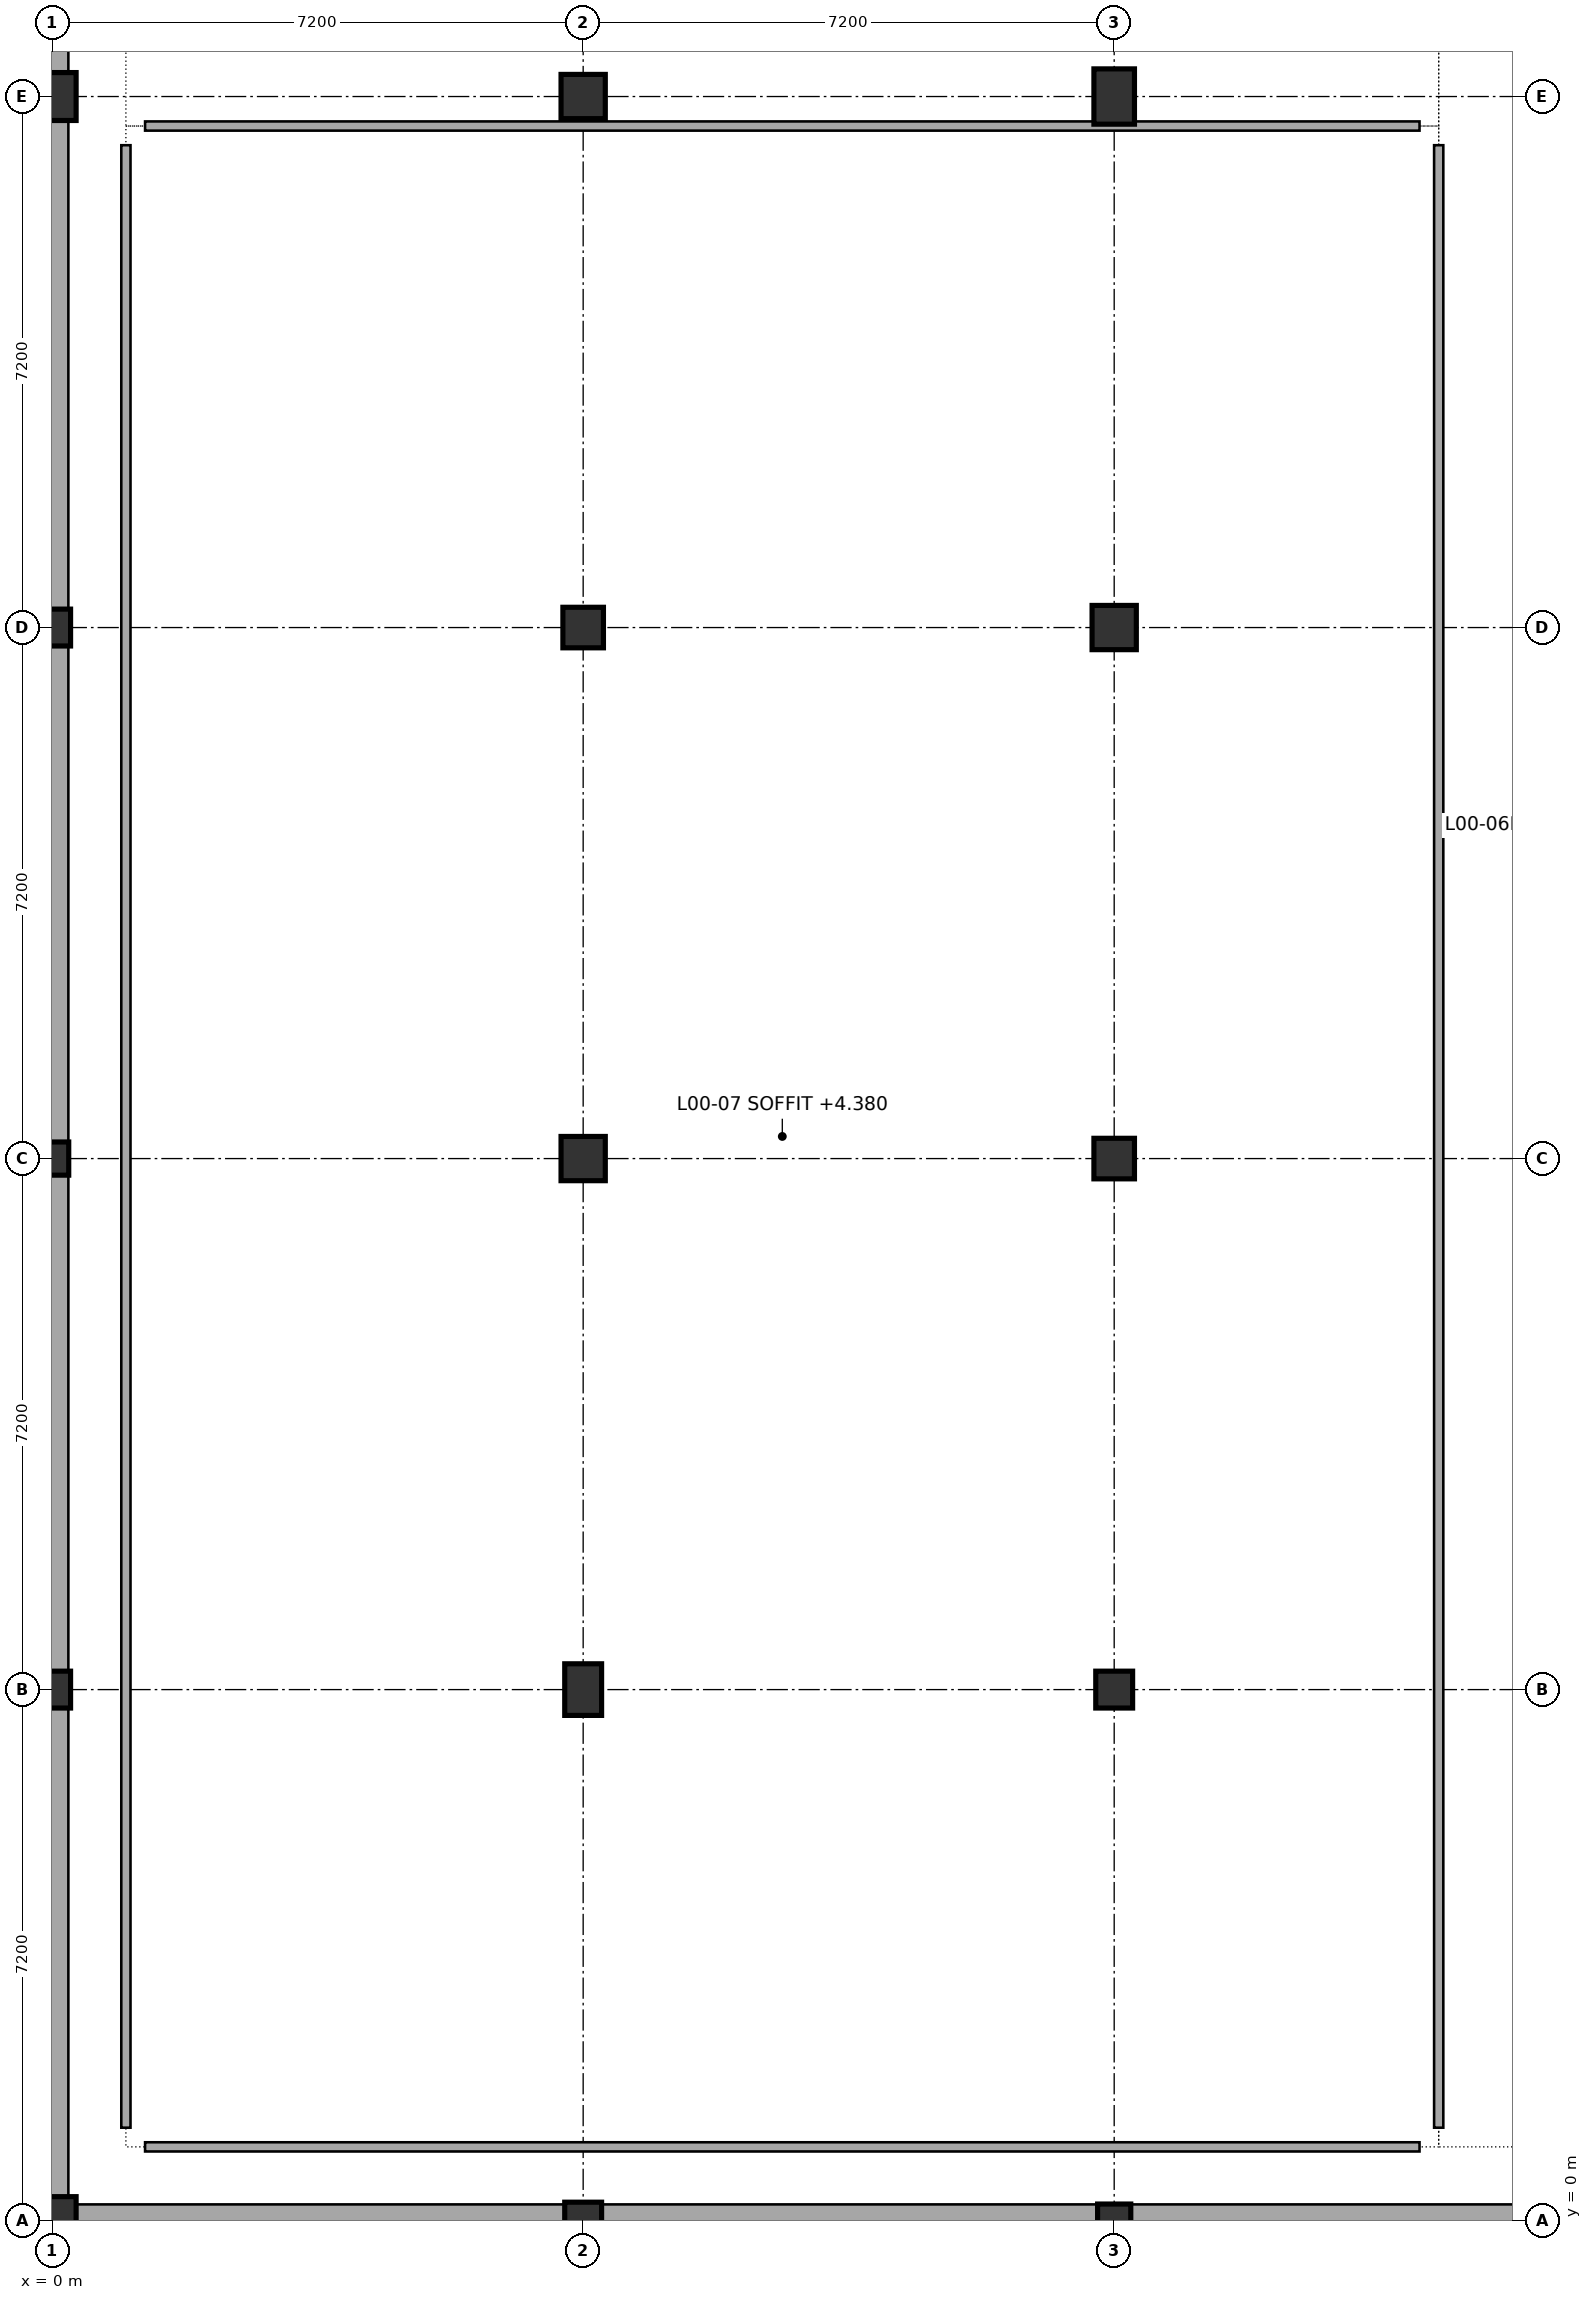
"""IFC4 building model, lengths in metres.
Left out: names, types, materials, properties, quantities, classifications, styles, units other than length and angle.
Written with IfcOpenShell. Run it as: python <this file> out.ifc"""

import sys

from ifc_helpers import new_model, si_unit, direction, frame, frame_2d, origin, origin_with_axes, origin_2d, place, context, subcontext, project, spatial, rectangle, circle, extrude, element, fill, save


model = new_model("IFC4")
c1 = context("Model", 3, precision=1e-05, world=origin(), true_north=direction((0.0, 1.0)))
c2 = subcontext(c1, "Body", "Model", "MODEL_VIEW")
j1 = project(units=[si_unit("LENGTHUNIT", "METRE"), si_unit("PLANEANGLEUNIT", "RADIAN")], contexts=[c1])
p1 = place(None, origin())
s1 = spatial("IfcSite", under=j1, at=p1, CompositionType="ELEMENT")
p2 = place(p1, origin())
s2 = spatial("IfcBuilding", under=s1, at=p2, CompositionType="ELEMENT")
p3 = place(p2, origin())
s3 = spatial("IfcBuildingStorey", under=s2, at=p3, CompositionType="ELEMENT", Elevation=0.0)
p4 = place(p3, origin_with_axes())
e1 = element("IfcColumn", 1, at=p4, inside=s3, PredefinedType="COLUMN", context=c2, shape_type="SweptSolid", body=[
    extrude(circle(Radius=0.325, at=origin_2d()), origin(), (0.0, 0.0, 1.0), 4.8),
])
p5 = place(p3, frame((0.0, 7.2, 0.0), z_axis=(0.0, 0.0, 1.0), x_axis=(1.0, 0.0, 0.0)))
e2 = element("IfcColumn", 2, at=p5, inside=s3, PredefinedType="COLUMN", context=c2, shape_type="SweptSolid", body=[
    extrude(rectangle(XDim=0.5, YDim=0.5, at=origin_2d()), origin(), (0.0, 0.0, 1.0), 4.8),
])
p6 = place(p3, frame((0.0, 14.4, 0.0), z_axis=(0.0, 0.0, 1.0), x_axis=(1.0, 0.0, 0.0)))
e3 = element("IfcColumn", 3, at=p6, inside=s3, PredefinedType="COLUMN", context=c2, shape_type="SweptSolid", body=[
    extrude(rectangle(XDim=0.45, YDim=0.45, at=origin_2d()), origin(), (0.0, 0.0, 1.0), 4.8),
])
p7 = place(p3, frame((0.0, 21.6, 0.0), z_axis=(0.0, 0.0, 1.0), x_axis=(1.0, 0.0, 0.0)))
e4 = element("IfcColumn", 4, at=p7, inside=s3, PredefinedType="COLUMN", context=c2, shape_type="SweptSolid", body=[
    extrude(rectangle(XDim=0.5, YDim=0.5, at=origin_2d()), origin(), (0.0, 0.0, 1.0), 4.8),
])
p8 = place(p3, frame((0.0, 28.8, 0.0), z_axis=(0.0, 0.0, 1.0), x_axis=(1.0, 0.0, 0.0)))
e5 = element("IfcColumn", 5, at=p8, inside=s3, PredefinedType="COLUMN", context=c2, shape_type="SweptSolid", body=[
    extrude(circle(Radius=0.325, at=origin_2d()), origin(), (0.0, 0.0, 1.0), 4.8),
])
p9 = place(p3, frame((7.2, 0.0, 0.0), z_axis=(0.0, 0.0, 1.0), x_axis=(1.0, 0.0, 0.0)))
e6 = element("IfcColumn", 6, at=p9, inside=s3, PredefinedType="COLUMN", context=c2, shape_type="SweptSolid", body=[
    extrude(rectangle(XDim=0.5, YDim=0.5, at=origin_2d()), origin(), (0.0, 0.0, 1.0), 4.8),
])
p10 = place(p3, frame((7.2, 7.2, 0.0), z_axis=(0.0, 0.0, 1.0), x_axis=(1.0, 0.0, 0.0)))
e7 = element("IfcColumn", 7, at=p10, inside=s3, PredefinedType="COLUMN", context=c2, shape_type="SweptSolid", body=[
    extrude(rectangle(XDim=0.5, YDim=0.7, at=origin_2d()), origin(), (0.0, 0.0, 1.0), 4.8),
])
p11 = place(p3, frame((7.2, 14.4, 0.0), z_axis=(0.0, 0.0, 1.0), x_axis=(1.0, 0.0, 0.0)))
e8 = element("IfcColumn", 8, at=p11, inside=s3, PredefinedType="COLUMN", context=c2, shape_type="SweptSolid", body=[
    extrude(rectangle(XDim=0.6, YDim=0.6, at=origin_2d()), origin(), (0.0, 0.0, 1.0), 4.8),
])
p12 = place(p3, frame((7.2, 21.6, 0.0), z_axis=(0.0, 0.0, 1.0), x_axis=(1.0, 0.0, 0.0)))
e9 = element("IfcColumn", 9, at=p12, inside=s3, PredefinedType="COLUMN", context=c2, shape_type="SweptSolid", body=[
    extrude(rectangle(XDim=0.55, YDim=0.55, at=origin_2d()), origin(), (0.0, 0.0, 1.0), 4.8),
])
p13 = place(p3, frame((7.2, 28.8, 0.0), z_axis=(0.0, 0.0, 1.0), x_axis=(1.0, 0.0, 0.0)))
e10 = element("IfcColumn", 10, at=p13, inside=s3, PredefinedType="COLUMN", context=c2, shape_type="SweptSolid", body=[
    extrude(rectangle(XDim=0.6, YDim=0.6, at=origin_2d()), origin(), (0.0, 0.0, 1.0), 4.8),
])
p14 = place(p3, frame((14.4, 0.0, 0.0), z_axis=(0.0, 0.0, 1.0), x_axis=(1.0, 0.0, 0.0)))
e11 = element("IfcColumn", 11, at=p14, inside=s3, PredefinedType="COLUMN", context=c2, shape_type="SweptSolid", body=[
    extrude(rectangle(XDim=0.45, YDim=0.45, at=origin_2d()), origin(), (0.0, 0.0, 1.0), 4.8),
])
p15 = place(p3, frame((14.4, 7.2, 0.0), z_axis=(0.0, 0.0, 1.0), x_axis=(1.0, 0.0, 0.0)))
e12 = element("IfcColumn", 12, at=p15, inside=s3, PredefinedType="COLUMN", context=c2, shape_type="SweptSolid", body=[
    extrude(rectangle(XDim=0.5, YDim=0.5, at=origin_2d()), origin(), (0.0, 0.0, 1.0), 4.8),
])
p16 = place(p3, frame((14.4, 14.4, 0.0), z_axis=(0.0, 0.0, 1.0), x_axis=(1.0, 0.0, 0.0)))
e13 = element("IfcColumn", 13, at=p16, inside=s3, PredefinedType="COLUMN", context=c2, shape_type="SweptSolid", body=[
    extrude(rectangle(XDim=0.55, YDim=0.55, at=origin_2d()), origin(), (0.0, 0.0, 1.0), 4.8),
])
p17 = place(p3, frame((14.4, 21.6, 0.0), z_axis=(0.0, 0.0, 1.0), x_axis=(1.0, 0.0, 0.0)))
e14 = element("IfcColumn", 14, at=p17, inside=s3, PredefinedType="COLUMN", context=c2, shape_type="SweptSolid", body=[
    extrude(rectangle(XDim=0.6, YDim=0.6, at=origin_2d()), origin(), (0.0, 0.0, 1.0), 4.8),
])
p18 = place(p3, frame((14.4, 28.8, 0.0), z_axis=(0.0, 0.0, 1.0), x_axis=(1.0, 0.0, 0.0)))
e15 = element("IfcColumn", 15, at=p18, inside=s3, PredefinedType="COLUMN", context=c2, shape_type="SweptSolid", body=[
    extrude(rectangle(XDim=0.55, YDim=0.75, at=origin_2d()), origin(), (0.0, 0.0, 1.0), 4.8),
])
p19 = place(p3, frame((21.6, 0.0, 0.0), z_axis=(0.0, 0.0, 1.0), x_axis=(-1.0, 0.0, 0.0)))
e16 = element("IfcWall", 16, at=p19, inside=s3, PredefinedType="STANDARD", context=c2, shape_type="SweptSolid", body=[
    extrude(rectangle(XDim=7.2, YDim=0.44, at=frame_2d((3.6, 0.0))), origin(), (0.0, 0.0, 1.0), 4.44),
])
p20 = place(p19, frame((2.85, 0.0, 0.8)))
e17 = element("IfcOpeningElement", 17, at=p20, cuts=e16, PredefinedType="OPENING", context=c2, shape_type="SweptSolid", body=[
    extrude(rectangle(XDim=1.5, YDim=1.65, at=frame_2d((0.75, 0.825))), frame((0.0, 0.23, 0.0), z_axis=(0.0, -1.0, 0.0), x_axis=(1.0, 0.0, 0.0)), (0.0, 0.0, 1.0), 0.46),
])
p21 = place(p3, frame((14.4, 0.0, 0.0), z_axis=(0.0, 0.0, 1.0), x_axis=(-1.0, 0.0, 0.0)))
e18 = element("IfcWall", 18, at=p21, inside=s3, PredefinedType="STANDARD", context=c2, shape_type="SweptSolid", body=[
    extrude(rectangle(XDim=7.2, YDim=0.44, at=frame_2d((3.6, 0.0))), origin(), (0.0, 0.0, 1.0), 4.44),
])
p22 = place(p21, frame((2.7, 0.0, 0.8)))
e19 = element("IfcOpeningElement", 19, at=p22, cuts=e18, PredefinedType="OPENING", context=c2, shape_type="SweptSolid", body=[
    extrude(rectangle(XDim=1.8, YDim=1.65, at=frame_2d((0.9, 0.825))), frame((0.0, 0.23, 0.0), z_axis=(0.0, -1.0, 0.0), x_axis=(1.0, 0.0, 0.0)), (0.0, 0.0, 1.0), 0.46),
])
p23 = place(p3, frame((7.2, 0.0, 0.0), z_axis=(0.0, 0.0, 1.0), x_axis=(-1.0, 0.0, 0.0)))
e20 = element("IfcWall", 20, at=p23, inside=s3, PredefinedType="STANDARD", context=c2, shape_type="SweptSolid", body=[
    extrude(rectangle(XDim=7.2, YDim=0.44, at=frame_2d((3.6, 0.0))), origin(), (0.0, 0.0, 1.0), 4.44),
])
p24 = place(p23, frame((2.9, 0.0, 0.8)))
e21 = element("IfcOpeningElement", 21, at=p24, cuts=e20, PredefinedType="OPENING", context=c2, shape_type="SweptSolid", body=[
    extrude(rectangle(XDim=1.4, YDim=2.05, at=frame_2d((0.7, 1.025))), frame((0.0, 0.23, 0.0), z_axis=(0.0, -1.0, 0.0), x_axis=(1.0, 0.0, 0.0)), (0.0, 0.0, 1.0), 0.46),
])
p25 = place(p3, frame((0.0, 0.0, 0.0), z_axis=(0.0, 0.0, 1.0), x_axis=(0.0, 1.0, 0.0)))
e22 = element("IfcWall", 22, at=p25, inside=s3, PredefinedType="STANDARD", context=c2, shape_type="SweptSolid", body=[
    extrude(rectangle(XDim=7.2, YDim=0.44, at=frame_2d((3.6, 0.0))), origin(), (0.0, 0.0, 1.0), 4.44),
])
p26 = place(p25, frame((2.7, 0.0, 0.8)))
e23 = element("IfcOpeningElement", 23, at=p26, cuts=e22, PredefinedType="OPENING", context=c2, shape_type="SweptSolid", body=[
    extrude(rectangle(XDim=1.8, YDim=2.05, at=frame_2d((0.9, 1.025))), frame((0.0, 0.23, 0.0), z_axis=(0.0, -1.0, 0.0), x_axis=(1.0, 0.0, 0.0)), (0.0, 0.0, 1.0), 0.46),
])
p27 = place(p3, frame((0.0, 7.2, 0.0), z_axis=(0.0, 0.0, 1.0), x_axis=(0.0, 1.0, 0.0)))
e24 = element("IfcWall", 24, at=p27, inside=s3, PredefinedType="STANDARD", context=c2, shape_type="SweptSolid", body=[
    extrude(rectangle(XDim=7.2, YDim=0.44, at=frame_2d((3.6, 0.0))), origin(), (0.0, 0.0, 1.0), 4.44),
])
p28 = place(p27, frame((2.5, 0.0, 0.8)))
e25 = element("IfcOpeningElement", 25, at=p28, cuts=e24, PredefinedType="OPENING", context=c2, shape_type="SweptSolid", body=[
    extrude(rectangle(XDim=2.2, YDim=2.05, at=frame_2d((1.1, 1.025))), frame((0.0, 0.23, 0.0), z_axis=(0.0, -1.0, 0.0), x_axis=(1.0, 0.0, 0.0)), (0.0, 0.0, 1.0), 0.46),
])
p29 = place(p3, frame((0.0, 14.4, 0.0), z_axis=(0.0, 0.0, 1.0), x_axis=(0.0, 1.0, 0.0)))
e26 = element("IfcWall", 26, at=p29, inside=s3, PredefinedType="STANDARD", context=c2, shape_type="SweptSolid", body=[
    extrude(rectangle(XDim=7.2, YDim=0.44, at=frame_2d((3.6, 0.0))), origin(), (0.0, 0.0, 1.0), 4.44),
])
p30 = place(p29, frame((3.0, 0.0, 0.8)))
e27 = element("IfcOpeningElement", 27, at=p30, cuts=e26, PredefinedType="OPENING", context=c2, shape_type="SweptSolid", body=[
    extrude(rectangle(XDim=1.2, YDim=1.65, at=frame_2d((0.6, 0.825))), frame((0.0, 0.23, 0.0), z_axis=(0.0, -1.0, 0.0), x_axis=(1.0, 0.0, 0.0)), (0.0, 0.0, 1.0), 0.46),
])
p31 = place(p3, frame((0.0, 21.6, 0.0), z_axis=(0.0, 0.0, 1.0), x_axis=(0.0, 1.0, 0.0)))
e28 = element("IfcWall", 28, at=p31, inside=s3, PredefinedType="STANDARD", context=c2, shape_type="SweptSolid", body=[
    extrude(rectangle(XDim=7.2, YDim=0.44, at=frame_2d((3.6, 0.0))), origin(), (0.0, 0.0, 1.0), 4.44),
])
p32 = place(p31, frame((2.85, 0.0, 0.8)))
e29 = element("IfcOpeningElement", 29, at=p32, cuts=e28, PredefinedType="OPENING", context=c2, shape_type="SweptSolid", body=[
    extrude(rectangle(XDim=1.5, YDim=1.65, at=frame_2d((0.75, 0.825))), frame((0.0, 0.23, 0.0), z_axis=(0.0, -1.0, 0.0), x_axis=(1.0, 0.0, 0.0)), (0.0, 0.0, 1.0), 0.46),
])
p33 = place(p3, frame((0.0, 28.8, 0.0), z_axis=(0.0, 0.0, 1.0), x_axis=(0.0, 1.0, 0.0)))
e30 = element("IfcWall", 30, at=p33, inside=s3, PredefinedType="STANDARD", context=c2, shape_type="SweptSolid", body=[
    extrude(rectangle(XDim=7.2, YDim=0.44, at=frame_2d((3.6, 0.0))), origin(), (0.0, 0.0, 1.0), 4.44),
])
p34 = place(p33, frame((2.7, 0.0, 0.8)))
e31 = element("IfcOpeningElement", 31, at=p34, cuts=e30, PredefinedType="OPENING", context=c2, shape_type="SweptSolid", body=[
    extrude(rectangle(XDim=1.8, YDim=1.65, at=frame_2d((0.9, 0.825))), frame((0.0, 0.23, 0.0), z_axis=(0.0, -1.0, 0.0), x_axis=(1.0, 0.0, 0.0)), (0.0, 0.0, 1.0), 0.46),
])
p35 = place(p3, frame((1.26, 1.0, 0.0), z_axis=(0.0, 0.0, 1.0), x_axis=(1.0, 0.0, 0.0)))
e32 = element("IfcWall", 32, at=p35, inside=s3, PredefinedType="PARTITIONING", context=c2, shape_type="SweptSolid", body=[
    extrude(rectangle(XDim=17.28, YDim=0.125, at=frame_2d((8.64, 0.0))), origin(), (0.0, 0.0, 1.0), 4.44),
])
p36 = place(p3, frame((18.8, 1.26, 0.0), z_axis=(0.0, 0.0, 1.0), x_axis=(0.0, 1.0, 0.0)))
e33 = element("IfcWall", 33, at=p36, inside=s3, PredefinedType="PARTITIONING", context=c2, shape_type="SweptSolid", body=[
    extrude(rectangle(XDim=26.88, YDim=0.125, at=frame_2d((13.44, 0.0))), origin(), (0.0, 0.0, 1.0), 4.44),
])
p37 = place(p36, frame((12.59, 0.0, 0.0)))
e34 = element("IfcOpeningElement", 34, at=p37, cuts=e33, PredefinedType="OPENING", context=c2, shape_type="SweptSolid", body=[
    extrude(rectangle(XDim=1.7, YDim=2.2, at=frame_2d((0.85, 1.1))), frame((0.0, 0.073, 0.0), z_axis=(0.0, -1.0, 0.0), x_axis=(1.0, 0.0, 0.0)), (0.0, 0.0, 1.0), 0.145),
])
p38 = place(p3, frame((18.54, 28.4, 0.0), z_axis=(0.0, 0.0, 1.0), x_axis=(-1.0, 0.0, 0.0)))
e35 = element("IfcWall", 35, at=p38, inside=s3, PredefinedType="PARTITIONING", context=c2, shape_type="SweptSolid", body=[
    extrude(rectangle(XDim=17.28, YDim=0.125, at=frame_2d((8.64, 0.0))), origin(), (0.0, 0.0, 1.0), 3.615),
])
p39 = place(p3, frame((1.0, 28.14, 0.0), z_axis=(0.0, 0.0, 1.0), x_axis=(0.0, -1.0, 0.0)))
e36 = element("IfcWall", 36, at=p39, inside=s3, PredefinedType="PARTITIONING", context=c2, shape_type="SweptSolid", body=[
    extrude(rectangle(XDim=26.88, YDim=0.125, at=frame_2d((13.44, 0.0))), origin(), (0.0, 0.0, 1.0), 4.44),
])
p40 = place(p20, origin())
e37 = element("IfcWindow", 37, at=p40, inside=s3, PartitioningType="SINGLE_PANEL", PredefinedType="WINDOW", context=c2, shape_type="SweptSolid", body=[
    extrude(rectangle(XDim=1.5, YDim=1.65, at=frame_2d((0.75, 0.825))), frame((0.0, 0.03, 0.0), z_axis=(0.0, -1.0, 0.0), x_axis=(1.0, 0.0, 0.0)), (0.0, 0.0, 1.0), 0.06),
])
fill(e17, e37)
p41 = place(p22, origin())
e38 = element("IfcWindow", 38, at=p41, inside=s3, PartitioningType="SINGLE_PANEL", PredefinedType="WINDOW", context=c2, shape_type="SweptSolid", body=[
    extrude(rectangle(XDim=1.8, YDim=1.65, at=frame_2d((0.9, 0.825))), frame((0.0, 0.03, 0.0), z_axis=(0.0, -1.0, 0.0), x_axis=(1.0, 0.0, 0.0)), (0.0, 0.0, 1.0), 0.06),
])
fill(e19, e38)
p42 = place(p24, origin())
e39 = element("IfcWindow", 39, at=p42, inside=s3, PartitioningType="SINGLE_PANEL", PredefinedType="WINDOW", context=c2, shape_type="SweptSolid", body=[
    extrude(rectangle(XDim=1.4, YDim=2.05, at=frame_2d((0.7, 1.025))), frame((0.0, 0.03, 0.0), z_axis=(0.0, -1.0, 0.0), x_axis=(1.0, 0.0, 0.0)), (0.0, 0.0, 1.0), 0.06),
])
fill(e21, e39)
p43 = place(p26, origin())
e40 = element("IfcWindow", 40, at=p43, inside=s3, PartitioningType="SINGLE_PANEL", PredefinedType="WINDOW", context=c2, shape_type="SweptSolid", body=[
    extrude(rectangle(XDim=1.8, YDim=2.05, at=frame_2d((0.9, 1.025))), frame((0.0, 0.03, 0.0), z_axis=(0.0, -1.0, 0.0), x_axis=(1.0, 0.0, 0.0)), (0.0, 0.0, 1.0), 0.06),
])
fill(e23, e40)
p44 = place(p28, origin())
e41 = element("IfcWindow", 41, at=p44, inside=s3, PartitioningType="SINGLE_PANEL", PredefinedType="WINDOW", context=c2, shape_type="SweptSolid", body=[
    extrude(rectangle(XDim=2.2, YDim=2.05, at=frame_2d((1.1, 1.025))), frame((0.0, 0.03, 0.0), z_axis=(0.0, -1.0, 0.0), x_axis=(1.0, 0.0, 0.0)), (0.0, 0.0, 1.0), 0.06),
])
fill(e25, e41)
p45 = place(p30, origin())
e42 = element("IfcWindow", 42, at=p45, inside=s3, PartitioningType="SINGLE_PANEL", PredefinedType="WINDOW", context=c2, shape_type="SweptSolid", body=[
    extrude(rectangle(XDim=1.2, YDim=1.65, at=frame_2d((0.6, 0.825))), frame((0.0, 0.03, 0.0), z_axis=(0.0, -1.0, 0.0), x_axis=(1.0, 0.0, 0.0)), (0.0, 0.0, 1.0), 0.06),
])
fill(e27, e42)
p46 = place(p32, origin())
e43 = element("IfcWindow", 43, at=p46, inside=s3, PartitioningType="SINGLE_PANEL", PredefinedType="WINDOW", context=c2, shape_type="SweptSolid", body=[
    extrude(rectangle(XDim=1.5, YDim=1.65, at=frame_2d((0.75, 0.825))), frame((0.0, 0.03, 0.0), z_axis=(0.0, -1.0, 0.0), x_axis=(1.0, 0.0, 0.0)), (0.0, 0.0, 1.0), 0.06),
])
fill(e29, e43)
p47 = place(p37, origin())
e44 = element("IfcDoor", 44, at=p47, inside=s3, OperationType="DOUBLE_DOOR_SINGLE_SWING", PredefinedType="DOOR", context=c2, shape_type="SweptSolid", body=[
    extrude(rectangle(XDim=1.7, YDim=2.2, at=frame_2d((0.85, 1.1))), frame((0.0, 0.025, 0.0), z_axis=(0.0, -1.0, 0.0), x_axis=(1.0, 0.0, 0.0)), (0.0, 0.0, 1.0), 0.05),
])
fill(e34, e44)
save(model, sys.argv[1])
